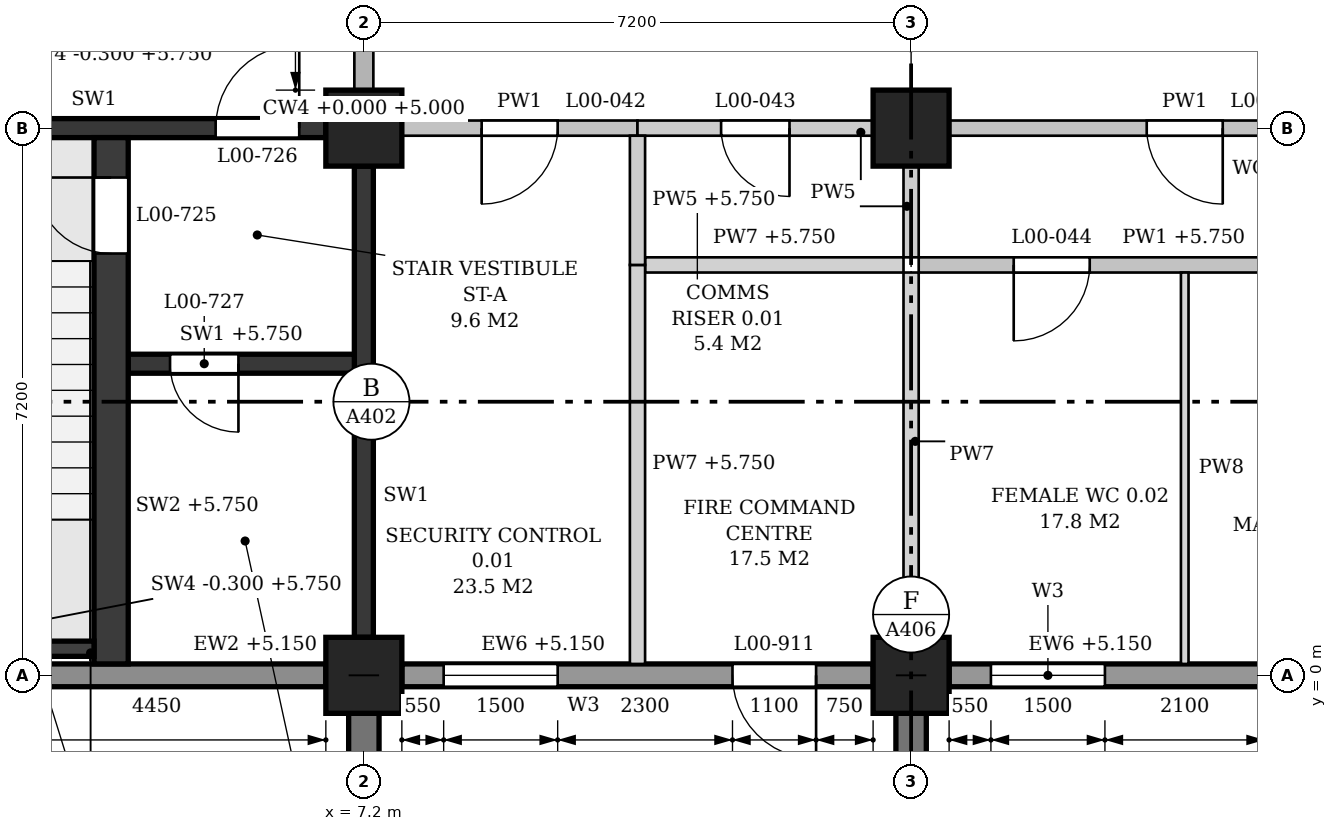
"""IFC4 building model, lengths in metres.
Left out: names, types, materials, properties, quantities, classifications, styles, units other than length and angle.
Written with IfcOpenShell. Run it as: python <this file> out.ifc"""

import sys

from ifc_helpers import new_model, si_unit, direction, frame, frame_2d, origin, origin_2d, place, context, subcontext, project, spatial, polyline, rectangle, outline, extrude, element, fill, save


model = new_model("IFC4")
c1 = context("Model", 3, precision=1e-05, world=origin(), true_north=direction((0.0, 1.0)))
c2 = subcontext(c1, "Body", "Model", "MODEL_VIEW")
j1 = project(units=[si_unit("LENGTHUNIT", "METRE"), si_unit("PLANEANGLEUNIT", "RADIAN")], contexts=[c1])
p1 = place(None, origin())
s1 = spatial("IfcSite", under=j1, at=p1, CompositionType="ELEMENT")
p2 = place(p1, origin())
s2 = spatial("IfcBuilding", under=s1, at=p2, CompositionType="ELEMENT")
p3 = place(p2, origin())
s3 = spatial("IfcBuildingStorey", under=s2, at=p3, CompositionType="ELEMENT", Elevation=0.0)
for number, where, z_axis, x_axis in (
    (1, (7.2, 0.0, 0.0), (0.0, 0.0, 1.0), (1.0, 0.0, 0.0)),
    (2, (7.2, 7.2, 0.0), (0.0, 0.0, 1.0), (1.0, 0.0, 0.0)),
    (3, (14.4, 0.0, 0.0), (0.0, 0.0, 1.0), (1.0, 0.0, 0.0)),
    (4, (14.4, 7.2, 0.0), (0.0, 0.0, 1.0), (1.0, 0.0, 0.0)),
):
    element("IfcColumn", number, at=place(p3, frame(where, z_axis=z_axis, x_axis=x_axis)), inside=s3, PredefinedType="COLUMN", context=c2, shape_type="SweptSolid", body=[
        extrude(rectangle(XDim=1.0, YDim=1.0, at=origin_2d()), origin(), (0.0, 0.0, 1.0), 6.0),
    ])
p4 = place(p3, frame((0.5, 0.0, 0.0), z_axis=(0.0, 0.0, 1.0), x_axis=(1.0, 0.0, 0.0)))
e5 = element("IfcWall", 5, at=p4, inside=s3, PredefinedType="STANDARD", context=c2, shape_type="SweptSolid", body=[
    extrude(rectangle(XDim=6.2, YDim=0.3, at=frame_2d((3.1, 0.0))), origin(), (0.0, 0.0, 1.0), 5.15),
])
p5 = place(p4, frame((0.85, 0.0, 0.9)))
e6 = element("IfcOpeningElement", 6, at=p5, cuts=e5, PredefinedType="OPENING", context=c2, shape_type="SweptSolid", body=[
    extrude(outline(polyline([(0.0, 0.0), (0.9, 0.0), (0.9, 3.55), (0.45, 4.0), (0.0, 3.55), (0.0, 0.0)])), frame((0.0, 0.16, 0.0), z_axis=(0.0, -1.0, 0.0), x_axis=(1.0, 0.0, 0.0)), (0.0, 0.0, 1.0), 0.32),
])
p6 = place(p3, frame((7.7, 0.0, 0.0), z_axis=(0.0, 0.0, 1.0), x_axis=(1.0, 0.0, 0.0)))
e7 = element("IfcWall", 7, at=p6, inside=s3, PredefinedType="STANDARD", context=c2, shape_type="SweptSolid", body=[
    extrude(rectangle(XDim=6.2, YDim=0.3, at=frame_2d((3.1, 0.0))), origin(), (0.0, 0.0, 1.0), 5.15),
])
p7 = place(p6, frame((4.35, 0.0, 0.0)))
e8 = element("IfcOpeningElement", 8, at=p7, cuts=e7, PredefinedType="OPENING", context=c2, shape_type="SweptSolid", body=[
    extrude(rectangle(XDim=1.1, YDim=2.1, at=frame_2d((0.55, 1.05))), frame((0.0, 0.16, 0.0), z_axis=(0.0, -1.0, 0.0), x_axis=(1.0, 0.0, 0.0)), (0.0, 0.0, 1.0), 0.32),
])
p8 = place(p6, frame((0.55, 0.0, 0.9)))
e9 = element("IfcOpeningElement", 9, at=p8, cuts=e7, PredefinedType="OPENING", context=c2, shape_type="SweptSolid", body=[
    extrude(outline(polyline([(0.0, 0.0), (1.5, 0.0), (1.5, 3.25), (0.75, 4.0), (0.0, 3.25), (0.0, 0.0)])), frame((0.0, 0.16, 0.0), z_axis=(0.0, -1.0, 0.0), x_axis=(1.0, 0.0, 0.0)), (0.0, 0.0, 1.0), 0.32),
])
p9 = place(p3, frame((14.9, 0.0, 0.0), z_axis=(0.0, 0.0, 1.0), x_axis=(1.0, 0.0, 0.0)))
e10 = element("IfcWall", 10, at=p9, inside=s3, PredefinedType="STANDARD", context=c2, shape_type="SweptSolid", body=[
    extrude(rectangle(XDim=6.2, YDim=0.3, at=frame_2d((3.1, 0.0))), origin(), (0.0, 0.0, 1.0), 5.15),
])
p10 = place(p9, frame((0.55, 0.0, 0.9)))
e11 = element("IfcOpeningElement", 11, at=p10, cuts=e10, PredefinedType="OPENING", context=c2, shape_type="SweptSolid", body=[
    extrude(outline(polyline([(0.0, 0.0), (1.5, 0.0), (1.5, 3.25), (0.75, 4.0), (0.0, 3.25), (0.0, 0.0)])), frame((0.0, 0.16, 0.0), z_axis=(0.0, -1.0, 0.0), x_axis=(1.0, 0.0, 0.0)), (0.0, 0.0, 1.0), 0.32),
])
p11 = place(p9, frame((4.15, 0.0, 0.9)))
e12 = element("IfcOpeningElement", 12, at=p11, cuts=e10, PredefinedType="OPENING", context=c2, shape_type="SweptSolid", body=[
    extrude(outline(polyline([(0.0, 0.0), (1.5, 0.0), (1.5, 3.25), (0.75, 4.0), (0.0, 3.25), (0.0, 0.0)])), frame((0.0, 0.16, 0.0), z_axis=(0.0, -1.0, 0.0), x_axis=(1.0, 0.0, 0.0)), (0.0, 0.0, 1.0), 0.32),
])
for number, where, z_axis, x_axis in (
    (13, (7.2, -0.5, 0.0), (0.0, 0.0, 1.0), (0.0, -1.0, 0.0)),
    (14, (14.4, -0.5, 0.0), (0.0, 0.0, 1.0), (0.0, -1.0, 0.0)),
):
    element("IfcWall", number, at=place(p3, frame(where, z_axis=z_axis, x_axis=x_axis)), inside=s3, PredefinedType="POLYGONAL", context=c2, shape_type="SweptSolid", body=[
        extrude(outline(polyline([(1.2, 0.0), (1.2, 20.825), (0.85, 21.35), (0.0, 21.35), (0.0, 0.0), (1.2, 0.0)])), frame((0.0, 0.2, 0.0), z_axis=(0.0, -1.0, 0.0), x_axis=(1.0, 0.0, 0.0)), (0.0, 0.0, 1.0), 0.4),
    ])
p12 = place(p3, frame((0.6, 7.2, 0.0), z_axis=(0.0, 0.0, 1.0), x_axis=(1.0, 0.0, 0.0)))
e15 = element("IfcWall", 15, at=p12, inside=s3, PredefinedType="SHEAR", context=c2, shape_type="SweptSolid", body=[
    extrude(rectangle(XDim=6.1, YDim=0.25, at=frame_2d((3.05, 0.0))), origin(), (0.0, 0.0, 1.0), 5.0),
])
p13 = place(p12, frame((4.65, 0.0, 0.0)))
e16 = element("IfcOpeningElement", 16, at=p13, cuts=e15, PredefinedType="OPENING", context=c2, shape_type="SweptSolid", body=[
    extrude(rectangle(XDim=1.1, YDim=2.1, at=frame_2d((0.55, 1.05))), frame((0.0, 0.135, 0.0), z_axis=(0.0, -1.0, 0.0), x_axis=(1.0, 0.0, 0.0)), (0.0, 0.0, 1.0), 0.27),
])
p14 = place(p3, frame((7.2, 0.5, 0.0), z_axis=(0.0, 0.0, 1.0), x_axis=(0.0, 1.0, 0.0)))
e17 = element("IfcWall", 17, at=p14, inside=s3, PredefinedType="SHEAR", context=c2, shape_type="SweptSolid", body=[
    extrude(rectangle(XDim=6.2, YDim=0.25, at=frame_2d((3.1, 0.0))), origin(), (0.0, 0.0, 1.0), 5.0),
])
p15 = place(p3, frame((2.25, 0.35, -0.3), z_axis=(0.0, 0.0, 1.0), x_axis=(1.0, 0.0, 0.0)))
e18 = element("IfcWall", 18, at=p15, inside=s3, PredefinedType="SHEAR", context=c2, shape_type="SweptSolid", body=[
    extrude(rectangle(XDim=1.4, YDim=0.2, at=frame_2d((0.7, 0.0))), origin(), (0.0, 0.0, 1.0), 6.05),
])
p16 = place(p3, frame((3.875, 0.15, 0.0), z_axis=(0.0, 0.0, 1.0), x_axis=(0.0, 1.0, 0.0)))
e19 = element("IfcWall", 19, at=p16, inside=s3, PredefinedType="SHEAR", context=c2, shape_type="SweptSolid", body=[
    extrude(rectangle(XDim=6.925, YDim=0.45, at=frame_2d((3.462, 0.0))), origin(), (0.0, 0.0, 1.0), 5.75),
])
p17 = place(p16, frame((5.4, 0.0, 0.0)))
e20 = element("IfcOpeningElement", 20, at=p17, cuts=e19, PredefinedType="OPENING", context=c2, shape_type="SweptSolid", body=[
    extrude(rectangle(XDim=1.0, YDim=2.1, at=frame_2d((0.5, 1.05))), frame((0.0, 0.235, 0.0), z_axis=(0.0, -1.0, 0.0), x_axis=(1.0, 0.0, 0.0)), (0.0, 0.0, 1.0), 0.47),
])
p18 = place(p3, frame((4.1, 4.1, 0.0), z_axis=(0.0, 0.0, 1.0), x_axis=(1.0, 0.0, 0.0)))
e21 = element("IfcWall", 21, at=p18, inside=s3, PredefinedType="SHEAR", context=c2, shape_type="SweptSolid", body=[
    extrude(rectangle(XDim=2.975, YDim=0.25, at=frame_2d((1.487, 0.0))), origin(), (0.0, 0.0, 1.0), 5.75),
])
p19 = place(p18, frame((0.55, 0.0, 0.0)))
e22 = element("IfcOpeningElement", 22, at=p19, cuts=e21, PredefinedType="OPENING", context=c2, shape_type="SweptSolid", body=[
    extrude(rectangle(XDim=0.9, YDim=2.1, at=frame_2d((0.45, 1.05))), frame((0.0, 0.135, 0.0), z_axis=(0.0, -1.0, 0.0), x_axis=(1.0, 0.0, 0.0)), (0.0, 0.0, 1.0), 0.27),
])
p20 = place(p3, frame((10.9, 5.4, 0.0), z_axis=(0.0, 0.0, 1.0), x_axis=(1.0, 0.0, 0.0)))
e23 = element("IfcWall", 23, at=p20, inside=s3, PredefinedType="SOLIDWALL", context=c2, shape_type="SweptSolid", body=[
    extrude(outline(polyline([(0.0, 0.0), (3.4, 0.0), (3.4, 5.0), (3.25, 5.0), (3.25, 5.75), (0.0, 5.75), (0.0, 0.0)])), frame((0.0, 0.1, 0.0), z_axis=(0.0, -1.0, 0.0), x_axis=(1.0, 0.0, 0.0)), (0.0, 0.0, 1.0), 0.2),
])
p21 = place(p3, frame((14.5, 5.4, 0.0), z_axis=(0.0, 0.0, 1.0), x_axis=(1.0, 0.0, 0.0)))
e24 = element("IfcWall", 24, at=p21, inside=s3, PredefinedType="PARTITIONING", context=c2, shape_type="SweptSolid", body=[
    extrude(outline(polyline([(0.0, 0.0), (6.975, 0.0), (6.975, 5.0), (6.85, 5.0), (6.85, 5.75), (0.15, 5.75), (0.15, 5.0), (0.0, 5.0), (0.0, 0.0)])), frame((0.0, 0.1, 0.0), z_axis=(0.0, -1.0, 0.0), x_axis=(1.0, 0.0, 0.0)), (0.0, 0.0, 1.0), 0.2),
])
p22 = place(p21, frame((1.25, 0.0, 0.0)))
e25 = element("IfcOpeningElement", 25, at=p22, cuts=e24, PredefinedType="OPENING", context=c2, shape_type="SweptSolid", body=[
    extrude(rectangle(XDim=1.0, YDim=2.1, at=frame_2d((0.5, 1.05))), frame((0.0, 0.11, 0.0), z_axis=(0.0, -1.0, 0.0), x_axis=(1.0, 0.0, 0.0)), (0.0, 0.0, 1.0), 0.22),
])
p23 = place(p21, frame((4.738, 0.0, 0.0)))
e26 = element("IfcOpeningElement", 26, at=p23, cuts=e24, PredefinedType="OPENING", context=c2, shape_type="SweptSolid", body=[
    extrude(rectangle(XDim=1.0, YDim=2.1, at=frame_2d((0.5, 1.05))), frame((0.0, 0.11, 0.0), z_axis=(0.0, -1.0, 0.0), x_axis=(1.0, 0.0, 0.0)), (0.0, 0.0, 1.0), 0.22),
])
p24 = place(p3, frame((7.7, 7.2, 0.0), z_axis=(0.0, 0.0, 1.0), x_axis=(1.0, 0.0, 0.0)))
e27 = element("IfcWall", 27, at=p24, inside=s3, PredefinedType="PARTITIONING", context=c2, shape_type="SweptSolid", body=[
    extrude(rectangle(XDim=3.1, YDim=0.2, at=frame_2d((1.55, 0.0))), origin(), (0.0, 0.0, 1.0), 5.0),
])
p25 = place(p24, frame((1.05, 0.0, 0.0)))
e28 = element("IfcOpeningElement", 28, at=p25, cuts=e27, PredefinedType="OPENING", context=c2, shape_type="SweptSolid", body=[
    extrude(rectangle(XDim=1.0, YDim=2.1, at=frame_2d((0.5, 1.05))), frame((0.0, 0.11, 0.0), z_axis=(0.0, -1.0, 0.0), x_axis=(1.0, 0.0, 0.0)), (0.0, 0.0, 1.0), 0.22),
])
p26 = place(p3, frame((10.8, 7.2, 0.0), z_axis=(0.0, 0.0, 1.0), x_axis=(1.0, 0.0, 0.0)))
e29 = element("IfcWall", 29, at=p26, inside=s3, PredefinedType="SOLIDWALL", context=c2, shape_type="SweptSolid", body=[
    extrude(rectangle(XDim=3.1, YDim=0.2, at=frame_2d((1.55, 0.0))), origin(), (0.0, 0.0, 1.0), 5.0),
])
p27 = place(p26, frame((1.1, 0.0, 0.0)))
e30 = element("IfcOpeningElement", 30, at=p27, cuts=e29, PredefinedType="OPENING", context=c2, shape_type="SweptSolid", body=[
    extrude(rectangle(XDim=0.9, YDim=2.1, at=frame_2d((0.45, 1.05))), frame((0.0, 0.11, 0.0), z_axis=(0.0, -1.0, 0.0), x_axis=(1.0, 0.0, 0.0)), (0.0, 0.0, 1.0), 0.22),
])
p28 = place(p3, frame((14.9, 7.2, 0.0), z_axis=(0.0, 0.0, 1.0), x_axis=(1.0, 0.0, 0.0)))
e31 = element("IfcWall", 31, at=p28, inside=s3, PredefinedType="PARTITIONING", context=c2, shape_type="SweptSolid", body=[
    extrude(rectangle(XDim=6.2, YDim=0.2, at=frame_2d((3.1, 0.0))), origin(), (0.0, 0.0, 1.0), 5.0),
])
p29 = place(p28, frame((2.6, 0.0, 0.0)))
e32 = element("IfcOpeningElement", 32, at=p29, cuts=e31, PredefinedType="OPENING", context=c2, shape_type="SweptSolid", body=[
    extrude(rectangle(XDim=1.0, YDim=2.1, at=frame_2d((0.5, 1.05))), frame((0.0, 0.11, 0.0), z_axis=(0.0, -1.0, 0.0), x_axis=(1.0, 0.0, 0.0)), (0.0, 0.0, 1.0), 0.22),
])
p30 = place(p3, frame((10.8, 0.15, 0.0), z_axis=(0.0, 0.0, 1.0), x_axis=(0.0, 1.0, 0.0)))
e33 = element("IfcWall", 33, at=p30, inside=s3, PredefinedType="SOLIDWALL", context=c2, shape_type="SweptSolid", body=[
    extrude(outline(polyline([(0.0, 0.0), (5.25, 0.0), (5.25, 5.75), (0.1, 5.75), (0.1, 5.15), (0.0, 5.15), (0.0, 0.0)])), frame((0.0, 0.1, 0.0), z_axis=(0.0, -1.0, 0.0), x_axis=(1.0, 0.0, 0.0)), (0.0, 0.0, 1.0), 0.2),
])
p31 = place(p3, frame((10.8, 5.4, 0.0), z_axis=(0.0, 0.0, 1.0), x_axis=(0.0, 1.0, 0.0)))
e34 = element("IfcWall", 34, at=p31, inside=s3, PredefinedType="SOLIDWALL", context=c2, shape_type="SweptSolid", body=[
    extrude(outline(polyline([(0.0, 0.0), (1.7, 0.0), (1.7, 5.0), (1.55, 5.0), (1.55, 5.75), (0.0, 5.75), (0.0, 0.0)])), frame((0.0, 0.1, 0.0), z_axis=(0.0, -1.0, 0.0), x_axis=(1.0, 0.0, 0.0)), (0.0, 0.0, 1.0), 0.2),
])
p32 = place(p3, frame((14.4, 0.5, 0.0), z_axis=(0.0, 0.0, 1.0), x_axis=(0.0, 1.0, 0.0)))
e35 = element("IfcWall", 35, at=p32, inside=s3, PredefinedType="SOLIDWALL", context=c2, shape_type="SweptSolid", body=[
    extrude(rectangle(XDim=4.8, YDim=0.2, at=frame_2d((2.4, 0.0))), origin(), (0.0, 0.0, 1.0), 5.0),
])
p33 = place(p3, frame((14.4, 5.5, 0.0), z_axis=(0.0, 0.0, 1.0), x_axis=(0.0, 1.0, 0.0)))
e36 = element("IfcWall", 36, at=p33, inside=s3, PredefinedType="SOLIDWALL", context=c2, shape_type="SweptSolid", body=[
    extrude(rectangle(XDim=1.2, YDim=0.2, at=frame_2d((0.6, 0.0))), origin(), (0.0, 0.0, 1.0), 5.0),
])
p34 = place(p3, frame((18.0, 0.15, 0.0), z_axis=(0.0, 0.0, 1.0), x_axis=(0.0, 1.0, 0.0)))
e37 = element("IfcWall", 37, at=p34, inside=s3, PredefinedType="PARTITIONING", context=c2, shape_type="SweptSolid", body=[
    extrude(rectangle(XDim=5.15, YDim=0.1, at=frame_2d((2.575, 0.0))), origin(), (0.0, 0.0, 1.0), 5.0),
])
p35 = place(p7, frame((1.1, 0.0, 0.0), z_axis=(0.0, 0.0, 1.0), x_axis=(-1.0, 0.0, 0.0)))
e38 = element("IfcDoor", 38, at=p35, inside=s3, OperationType="SINGLE_SWING_LEFT", PredefinedType="DOOR", context=c2, shape_type="SweptSolid", body=[
    extrude(rectangle(XDim=1.1, YDim=2.1, at=frame_2d((0.55, 1.05))), frame((0.0, 0.025, 0.0), z_axis=(0.0, -1.0, 0.0), x_axis=(1.0, 0.0, 0.0)), (0.0, 0.0, 1.0), 0.05),
])
fill(e8, e38)
p36 = place(p8, origin())
e39 = element("IfcWindow", 39, at=p36, inside=s3, PartitioningType="SINGLE_PANEL", PredefinedType="WINDOW", context=c2, shape_type="SweptSolid", body=[
    extrude(outline(polyline([(0.0, 0.0), (1.5, 0.0), (1.5, 3.25), (0.75, 4.0), (0.0, 3.25), (0.0, 0.0)])), frame((0.0, 0.03, 0.0), z_axis=(0.0, -1.0, 0.0), x_axis=(1.0, 0.0, 0.0)), (0.0, 0.0, 1.0), 0.06),
])
fill(e9, e39)
p37 = place(p10, origin())
e40 = element("IfcWindow", 40, at=p37, inside=s3, PartitioningType="SINGLE_PANEL", PredefinedType="WINDOW", context=c2, shape_type="SweptSolid", body=[
    extrude(outline(polyline([(0.0, 0.0), (1.5, 0.0), (1.5, 3.25), (0.75, 4.0), (0.0, 3.25), (0.0, 0.0)])), frame((0.0, 0.03, 0.0), z_axis=(0.0, -1.0, 0.0), x_axis=(1.0, 0.0, 0.0)), (0.0, 0.0, 1.0), 0.06),
])
fill(e11, e40)
p38 = place(p17, origin())
e41 = element("IfcDoor", 41, at=p38, inside=s3, OperationType="SINGLE_SWING_RIGHT", PredefinedType="DOOR", context=c2, shape_type="SweptSolid", body=[
    extrude(rectangle(XDim=1.0, YDim=2.1, at=frame_2d((0.5, 1.05))), frame((0.0, 0.025, 0.0), z_axis=(0.0, -1.0, 0.0), x_axis=(1.0, 0.0, 0.0)), (0.0, 0.0, 1.0), 0.05),
])
fill(e20, e41)
p39 = place(p13, origin())
e42 = element("IfcDoor", 42, at=p39, inside=s3, OperationType="SINGLE_SWING_RIGHT", PredefinedType="DOOR", context=c2, shape_type="SweptSolid", body=[
    extrude(rectangle(XDim=1.1, YDim=2.1, at=frame_2d((0.55, 1.05))), frame((0.0, 0.025, 0.0), z_axis=(0.0, -1.0, 0.0), x_axis=(1.0, 0.0, 0.0)), (0.0, 0.0, 1.0), 0.05),
])
fill(e16, e42)
p40 = place(p19, frame((0.9, 0.0, 0.0), z_axis=(0.0, 0.0, 1.0), x_axis=(-1.0, 0.0, 0.0)))
e43 = element("IfcDoor", 43, at=p40, inside=s3, OperationType="SINGLE_SWING_LEFT", PredefinedType="DOOR", context=c2, shape_type="SweptSolid", body=[
    extrude(rectangle(XDim=0.9, YDim=2.1, at=frame_2d((0.45, 1.05))), frame((0.0, 0.025, 0.0), z_axis=(0.0, -1.0, 0.0), x_axis=(1.0, 0.0, 0.0)), (0.0, 0.0, 1.0), 0.05),
])
fill(e22, e43)
p41 = place(p29, frame((1.0, 0.0, 0.0), z_axis=(0.0, 0.0, 1.0), x_axis=(-1.0, 0.0, 0.0)))
e44 = element("IfcDoor", 44, at=p41, inside=s3, OperationType="SINGLE_SWING_LEFT", PredefinedType="DOOR", context=c2, shape_type="SweptSolid", body=[
    extrude(rectangle(XDim=1.0, YDim=2.1, at=frame_2d((0.5, 1.05))), frame((0.0, 0.025, 0.0), z_axis=(0.0, -1.0, 0.0), x_axis=(1.0, 0.0, 0.0)), (0.0, 0.0, 1.0), 0.05),
])
fill(e32, e44)
p42 = place(p25, frame((1.0, 0.0, 0.0), z_axis=(0.0, 0.0, 1.0), x_axis=(-1.0, 0.0, 0.0)))
e45 = element("IfcDoor", 45, at=p42, inside=s3, OperationType="SINGLE_SWING_RIGHT", PredefinedType="DOOR", context=c2, shape_type="SweptSolid", body=[
    extrude(rectangle(XDim=1.0, YDim=2.1, at=frame_2d((0.5, 1.05))), frame((0.0, 0.025, 0.0), z_axis=(0.0, -1.0, 0.0), x_axis=(1.0, 0.0, 0.0)), (0.0, 0.0, 1.0), 0.05),
])
fill(e28, e45)
p43 = place(p27, frame((0.9, 0.0, 0.0), z_axis=(0.0, 0.0, 1.0), x_axis=(-1.0, 0.0, 0.0)))
e46 = element("IfcDoor", 46, at=p43, inside=s3, OperationType="SINGLE_SWING_LEFT", PredefinedType="DOOR", context=c2, shape_type="SweptSolid", body=[
    extrude(rectangle(XDim=0.9, YDim=2.1, at=frame_2d((0.45, 1.05))), frame((0.0, 0.025, 0.0), z_axis=(0.0, -1.0, 0.0), x_axis=(1.0, 0.0, 0.0)), (0.0, 0.0, 1.0), 0.05),
])
fill(e30, e46)
p44 = place(p22, frame((1.0, 0.0, 0.0), z_axis=(0.0, 0.0, 1.0), x_axis=(-1.0, 0.0, 0.0)))
e47 = element("IfcDoor", 47, at=p44, inside=s3, OperationType="SINGLE_SWING_RIGHT", PredefinedType="DOOR", context=c2, shape_type="SweptSolid", body=[
    extrude(rectangle(XDim=1.0, YDim=2.1, at=frame_2d((0.5, 1.05))), frame((0.0, 0.025, 0.0), z_axis=(0.0, -1.0, 0.0), x_axis=(1.0, 0.0, 0.0)), (0.0, 0.0, 1.0), 0.05),
])
fill(e25, e47)
save(model, sys.argv[1])
